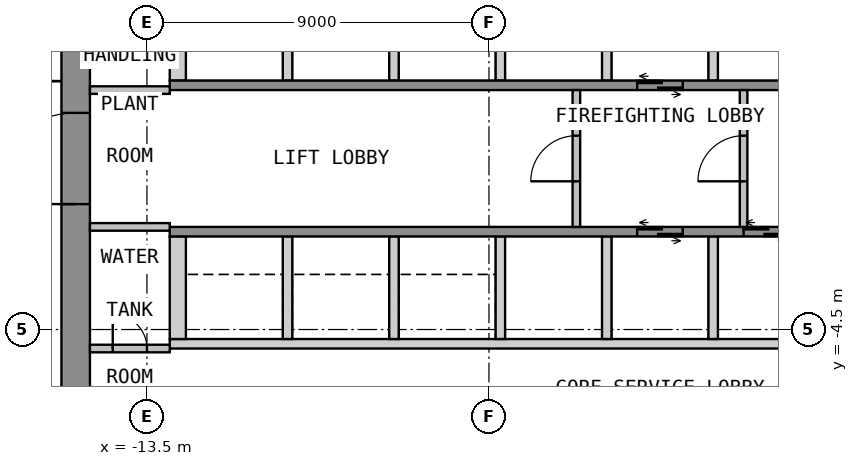
"""IFC4 building model, lengths in metres.
Left out: names, types, materials, properties, quantities, classifications, styles, units other than length and angle.
Written with IfcOpenShell. Run it as: python <this file> out.ifc"""

import sys

from ifc_helpers import new_model, si_unit, direction, frame, frame_2d, origin, place, context, subcontext, project, spatial, polyline, rectangle, outline, extrude, element, fill, save


model = new_model("IFC4")
c1 = context("Model", 3, precision=1e-05, world=origin(), true_north=direction((0.0, 1.0)))
c2 = subcontext(c1, "Body", "Model", "MODEL_VIEW")
j1 = project(units=[si_unit("LENGTHUNIT", "METRE"), si_unit("PLANEANGLEUNIT", "RADIAN")], contexts=[c1])
p1 = place(None, origin())
s1 = spatial("IfcSite", under=j1, at=p1, CompositionType="ELEMENT")
p2 = place(p1, origin())
s2 = spatial("IfcBuilding", under=s1, at=p2, CompositionType="ELEMENT")
p3 = place(p2, frame((0.0, 0.0, 128.1)))
s3 = spatial("IfcBuildingStorey", under=s2, at=p3, CompositionType="ELEMENT", Elevation=128.1)
p4 = place(p3, frame((-15.375, -12.75, 0.0), z_axis=(0.0, 0.0, 1.0), x_axis=(0.0, 1.0, 0.0)))
e1 = element("IfcWall", 1, at=p4, inside=s3, PredefinedType="SHEAR", context=c2, shape_type="SweptSolid", body=[
    extrude(rectangle(XDim=25.5, YDim=0.75, at=frame_2d((12.75, 0.0))), origin(), (0.0, 0.0, 1.0), 4.175),
])
p5 = place(p4, frame((11.55, 0.0, 0.0)))
e2 = element("IfcOpeningElement", 2, at=p5, cuts=e1, PredefinedType="OPENING", context=c2, shape_type="SweptSolid", body=[
    extrude(rectangle(XDim=2.4, YDim=2.1, at=frame_2d((1.2, 1.05))), frame((0.0, 0.385, 0.0), z_axis=(0.0, -1.0, 0.0), x_axis=(1.0, 0.0, 0.0)), (0.0, 0.0, 1.0), 0.77),
])
p6 = place(p3, origin())
e3 = element("IfcWall", 3, at=p6, inside=s3, PredefinedType="SHEAR", context=c2, shape_type="SweptSolid", body=[
    extrude(outline(polyline([(-12.9, 2.05), (-12.475, 2.05), (-12.475, 4.75), (-12.9, 4.75), (-12.9, 2.05)])), origin(), (0.0, 0.0, 1.0), 4.175),
])
p7 = place(p3, origin())
e4 = element("IfcWall", 4, at=p7, inside=s3, PredefinedType="SHEAR", context=c2, shape_type="SweptSolid", body=[
    extrude(outline(polyline([(-9.925, 2.05), (-9.675, 2.05), (-9.675, 4.75), (-9.925, 4.75), (-9.925, 2.05)])), origin(), (0.0, 0.0, 1.0), 4.175),
])
p8 = place(p3, origin())
e5 = element("IfcWall", 5, at=p8, inside=s3, PredefinedType="SHEAR", context=c2, shape_type="SweptSolid", body=[
    extrude(outline(polyline([(-7.125, 2.05), (-6.875, 2.05), (-6.875, 4.75), (-7.125, 4.75), (-7.125, 2.05)])), origin(), (0.0, 0.0, 1.0), 4.175),
])
p9 = place(p3, origin())
e6 = element("IfcWall", 6, at=p9, inside=s3, PredefinedType="SHEAR", context=c2, shape_type="SweptSolid", body=[
    extrude(outline(polyline([(-4.325, 2.05), (-4.075, 2.05), (-4.075, 4.75), (-4.325, 4.75), (-4.325, 2.05)])), origin(), (0.0, 0.0, 1.0), 4.175),
])
p10 = place(p3, origin())
e7 = element("IfcWall", 7, at=p10, inside=s3, PredefinedType="SHEAR", context=c2, shape_type="SweptSolid", body=[
    extrude(outline(polyline([(-1.525, 2.05), (-1.275, 2.05), (-1.275, 4.75), (-1.525, 4.75), (-1.525, 2.05)])), origin(), (0.0, 0.0, 1.0), 4.175),
])
p11 = place(p3, origin())
e8 = element("IfcWall", 8, at=p11, inside=s3, PredefinedType="SHEAR", context=c2, shape_type="SweptSolid", body=[
    extrude(outline(polyline([(1.275, 2.05), (1.525, 2.05), (1.525, 4.75), (1.275, 4.75), (1.275, 2.05)])), origin(), (0.0, 0.0, 1.0), 4.175),
])
p12 = place(p3, frame((-12.9, 1.925, 0.0), z_axis=(0.0, 0.0, 1.0), x_axis=(1.0, 0.0, 0.0)))
e9 = element("IfcWall", 9, at=p12, inside=s3, PredefinedType="SHEAR", context=c2, shape_type="SweptSolid", body=[
    extrude(rectangle(XDim=25.8, YDim=0.25, at=frame_2d((12.9, 0.0))), origin(), (0.0, 0.0, 1.0), 4.175),
])
p13 = place(p12, frame((12.3, 0.0, 0.0)))
e10 = element("IfcOpeningElement", 10, at=p13, cuts=e9, PredefinedType="OPENING", context=c2, shape_type="SweptSolid", body=[
    extrude(rectangle(XDim=1.2, YDim=2.1, at=frame_2d((0.6, 1.05))), frame((0.0, 0.135, 0.0), z_axis=(0.0, -1.0, 0.0), x_axis=(1.0, 0.0, 0.0)), (0.0, 0.0, 1.0), 0.27),
])
p14 = place(p12, frame((23.5, 0.0, 0.0)))
e11 = element("IfcOpeningElement", 11, at=p14, cuts=e9, PredefinedType="OPENING", context=c2, shape_type="SweptSolid", body=[
    extrude(rectangle(XDim=1.2, YDim=2.1, at=frame_2d((0.6, 1.05))), frame((0.0, 0.135, 0.0), z_axis=(0.0, -1.0, 0.0), x_axis=(1.0, 0.0, 0.0)), (0.0, 0.0, 1.0), 0.27),
])
p15 = place(p3, origin())
e12 = element("IfcWall", 12, at=p15, inside=s3, PredefinedType="SHEAR", context=c2, shape_type="SweptSolid", body=[
    extrude(outline(polyline([(-12.9, -5.0), (12.9, -5.0), (12.9, -4.75), (-12.9, -4.75), (-12.9, -5.0)])), origin(), (0.0, 0.0, 1.0), 4.175),
])
p16 = place(p3, origin())
e13 = element("IfcWall", 13, at=p16, inside=s3, PredefinedType="SHEAR", context=c2, shape_type="SweptSolid", body=[
    extrude(outline(polyline([(-12.9, -4.75), (-12.475, -4.75), (-12.475, -2.05), (-12.9, -2.05), (-12.9, -4.75)])), origin(), (0.0, 0.0, 1.0), 4.175),
])
p17 = place(p3, origin())
e14 = element("IfcWall", 14, at=p17, inside=s3, PredefinedType="SHEAR", context=c2, shape_type="SweptSolid", body=[
    extrude(outline(polyline([(-9.925, -4.75), (-9.675, -4.75), (-9.675, -2.05), (-9.925, -2.05), (-9.925, -4.75)])), origin(), (0.0, 0.0, 1.0), 4.175),
])
p18 = place(p3, origin())
e15 = element("IfcWall", 15, at=p18, inside=s3, PredefinedType="SHEAR", context=c2, shape_type="SweptSolid", body=[
    extrude(outline(polyline([(-7.125, -4.75), (-6.875, -4.75), (-6.875, -2.05), (-7.125, -2.05), (-7.125, -4.75)])), origin(), (0.0, 0.0, 1.0), 4.175),
])
p19 = place(p3, origin())
e16 = element("IfcWall", 16, at=p19, inside=s3, PredefinedType="SHEAR", context=c2, shape_type="SweptSolid", body=[
    extrude(outline(polyline([(-4.325, -4.75), (-4.075, -4.75), (-4.075, -2.05), (-4.325, -2.05), (-4.325, -4.75)])), origin(), (0.0, 0.0, 1.0), 4.175),
])
p20 = place(p3, origin())
e17 = element("IfcWall", 17, at=p20, inside=s3, PredefinedType="SHEAR", context=c2, shape_type="SweptSolid", body=[
    extrude(outline(polyline([(-1.525, -4.75), (-1.275, -4.75), (-1.275, -2.05), (-1.525, -2.05), (-1.525, -4.75)])), origin(), (0.0, 0.0, 1.0), 4.175),
])
p21 = place(p3, origin())
e18 = element("IfcWall", 18, at=p21, inside=s3, PredefinedType="SHEAR", context=c2, shape_type="SweptSolid", body=[
    extrude(outline(polyline([(1.275, -4.75), (1.525, -4.75), (1.525, -2.05), (1.275, -2.05), (1.275, -4.75)])), origin(), (0.0, 0.0, 1.0), 4.175),
])
p22 = place(p3, frame((-12.9, -1.925, 0.0), z_axis=(0.0, 0.0, 1.0), x_axis=(1.0, 0.0, 0.0)))
e19 = element("IfcWall", 19, at=p22, inside=s3, PredefinedType="SHEAR", context=c2, shape_type="SweptSolid", body=[
    extrude(rectangle(XDim=25.8, YDim=0.25, at=frame_2d((12.9, 0.0))), origin(), (0.0, 0.0, 1.0), 4.175),
])
p23 = place(p22, frame((12.3, 0.0, 0.0)))
e20 = element("IfcOpeningElement", 20, at=p23, cuts=e19, PredefinedType="OPENING", context=c2, shape_type="SweptSolid", body=[
    extrude(rectangle(XDim=1.2, YDim=2.1, at=frame_2d((0.6, 1.05))), frame((0.0, 0.135, 0.0), z_axis=(0.0, -1.0, 0.0), x_axis=(1.0, 0.0, 0.0)), (0.0, 0.0, 1.0), 0.27),
])
p24 = place(p22, frame((15.1, 0.0, 0.0)))
e21 = element("IfcOpeningElement", 21, at=p24, cuts=e19, PredefinedType="OPENING", context=c2, shape_type="SweptSolid", body=[
    extrude(rectangle(XDim=1.2, YDim=2.1, at=frame_2d((0.6, 1.05))), frame((0.0, 0.135, 0.0), z_axis=(0.0, -1.0, 0.0), x_axis=(1.0, 0.0, 0.0)), (0.0, 0.0, 1.0), 0.27),
])
p25 = place(p3, frame((-2.2, -1.8, 0.0), z_axis=(0.0, 0.0, 1.0), x_axis=(0.0, 1.0, 0.0)))
e22 = element("IfcWall", 22, at=p25, inside=s3, PredefinedType="PARTITIONING", context=c2, shape_type="SweptSolid", body=[
    extrude(rectangle(XDim=3.6, YDim=0.2, at=frame_2d((1.8, 0.0))), origin(), (0.0, 0.0, 1.0), 4.175),
])
p26 = place(p25, frame((1.2, 0.0, 0.0)))
e23 = element("IfcOpeningElement", 23, at=p26, cuts=e22, PredefinedType="OPENING", context=c2, shape_type="SweptSolid", body=[
    extrude(rectangle(XDim=1.2, YDim=2.1, at=frame_2d((0.6, 1.05))), frame((0.0, 0.11, 0.0), z_axis=(0.0, -1.0, 0.0), x_axis=(1.0, 0.0, 0.0)), (0.0, 0.0, 1.0), 0.22),
])
p27 = place(p3, frame((2.2, -1.8, 0.0), z_axis=(0.0, 0.0, 1.0), x_axis=(0.0, 1.0, 0.0)))
e24 = element("IfcWall", 24, at=p27, inside=s3, PredefinedType="PARTITIONING", context=c2, shape_type="SweptSolid", body=[
    extrude(rectangle(XDim=3.6, YDim=0.2, at=frame_2d((1.8, 0.0))), origin(), (0.0, 0.0, 1.0), 4.175),
])
p28 = place(p27, frame((1.2, 0.0, 0.0)))
e25 = element("IfcOpeningElement", 25, at=p28, cuts=e24, PredefinedType="OPENING", context=c2, shape_type="SweptSolid", body=[
    extrude(rectangle(XDim=1.2, YDim=2.1, at=frame_2d((0.6, 1.05))), frame((0.0, 0.11, 0.0), z_axis=(0.0, -1.0, 0.0), x_axis=(1.0, 0.0, 0.0)), (0.0, 0.0, 1.0), 0.22),
])
p29 = place(p3, frame((-15.0, 1.8, 0.0), z_axis=(0.0, 0.0, 1.0), x_axis=(1.0, 0.0, 0.0)))
e26 = element("IfcWall", 26, at=p29, inside=s3, PredefinedType="PARTITIONING", context=c2, shape_type="SweptSolid", body=[
    extrude(rectangle(XDim=2.1, YDim=0.2, at=frame_2d((1.05, 0.0))), origin(), (0.0, 0.0, 1.0), 4.175),
])
p30 = place(p3, frame((-15.0, -5.0, 0.0), z_axis=(0.0, 0.0, 1.0), x_axis=(1.0, 0.0, 0.0)))
e27 = element("IfcWall", 27, at=p30, inside=s3, PredefinedType="PARTITIONING", context=c2, shape_type="SweptSolid", body=[
    extrude(rectangle(XDim=2.1, YDim=0.2, at=frame_2d((1.05, 0.0))), origin(), (0.0, 0.0, 1.0), 4.175),
])
p31 = place(p30, frame((0.6, 0.0, 0.0)))
e28 = element("IfcOpeningElement", 28, at=p31, cuts=e27, PredefinedType="OPENING", context=c2, shape_type="SweptSolid", body=[
    extrude(rectangle(XDim=0.9, YDim=2.1, at=frame_2d((0.45, 1.05))), frame((0.0, 0.11, 0.0), z_axis=(0.0, -1.0, 0.0), x_axis=(1.0, 0.0, 0.0)), (0.0, 0.0, 1.0), 0.22),
])
p32 = place(p3, frame((-15.0, -1.8, 0.0), z_axis=(0.0, 0.0, 1.0), x_axis=(1.0, 0.0, 0.0)))
e29 = element("IfcWall", 29, at=p32, inside=s3, PredefinedType="PARTITIONING", context=c2, shape_type="SweptSolid", body=[
    extrude(rectangle(XDim=2.1, YDim=0.2, at=frame_2d((1.05, 0.0))), origin(), (0.0, 0.0, 1.0), 4.175),
])
p33 = place(p5, origin())
e30 = element("IfcDoor", 30, at=p33, inside=s3, OperationType="DOUBLE_DOOR_DOUBLE_SWING", PredefinedType="DOOR", context=c2, shape_type="SweptSolid", body=[
    extrude(rectangle(XDim=2.4, YDim=2.1, at=frame_2d((1.2, 1.05))), frame((0.0, 0.025, 0.0), z_axis=(0.0, -1.0, 0.0), x_axis=(1.0, 0.0, 0.0)), (0.0, 0.0, 1.0), 0.05),
])
fill(e2, e30)
p34 = place(p13, origin())
e31 = element("IfcDoor", 31, at=p34, inside=s3, OperationType="DOUBLE_DOOR_SLIDING", PredefinedType="DOOR", context=c2, shape_type="SweptSolid", body=[
    extrude(rectangle(XDim=1.2, YDim=2.1, at=frame_2d((0.6, 1.05))), frame((0.0, 0.025, 0.0), z_axis=(0.0, -1.0, 0.0), x_axis=(1.0, 0.0, 0.0)), (0.0, 0.0, 1.0), 0.05),
])
fill(e10, e31)
p35 = place(p23, origin())
e32 = element("IfcDoor", 32, at=p35, inside=s3, OperationType="DOUBLE_DOOR_SLIDING", PredefinedType="DOOR", context=c2, shape_type="SweptSolid", body=[
    extrude(rectangle(XDim=1.2, YDim=2.1, at=frame_2d((0.6, 1.05))), frame((0.0, 0.025, 0.0), z_axis=(0.0, -1.0, 0.0), x_axis=(1.0, 0.0, 0.0)), (0.0, 0.0, 1.0), 0.05),
])
fill(e20, e32)
p36 = place(p24, origin())
e33 = element("IfcDoor", 33, at=p36, inside=s3, OperationType="DOUBLE_DOOR_SLIDING", PredefinedType="DOOR", context=c2, shape_type="SweptSolid", body=[
    extrude(rectangle(XDim=1.2, YDim=2.1, at=frame_2d((0.6, 1.05))), frame((0.0, 0.025, 0.0), z_axis=(0.0, -1.0, 0.0), x_axis=(1.0, 0.0, 0.0)), (0.0, 0.0, 1.0), 0.05),
])
fill(e21, e33)
p37 = place(p26, origin())
e34 = element("IfcDoor", 34, at=p37, inside=s3, OperationType="SINGLE_SWING_LEFT", PredefinedType="DOOR", context=c2, shape_type="SweptSolid", body=[
    extrude(rectangle(XDim=1.2, YDim=2.1, at=frame_2d((0.6, 1.05))), frame((0.0, 0.025, 0.0), z_axis=(0.0, -1.0, 0.0), x_axis=(1.0, 0.0, 0.0)), (0.0, 0.0, 1.0), 0.05),
])
fill(e23, e34)
p38 = place(p28, origin())
e35 = element("IfcDoor", 35, at=p38, inside=s3, OperationType="SINGLE_SWING_LEFT", PredefinedType="DOOR", context=c2, shape_type="SweptSolid", body=[
    extrude(rectangle(XDim=1.2, YDim=2.1, at=frame_2d((0.6, 1.05))), frame((0.0, 0.025, 0.0), z_axis=(0.0, -1.0, 0.0), x_axis=(1.0, 0.0, 0.0)), (0.0, 0.0, 1.0), 0.05),
])
fill(e25, e35)
p39 = place(p31, origin())
e36 = element("IfcDoor", 36, at=p39, inside=s3, OperationType="SINGLE_SWING_LEFT", PredefinedType="DOOR", context=c2, shape_type="SweptSolid", body=[
    extrude(rectangle(XDim=0.9, YDim=2.1, at=frame_2d((0.45, 1.05))), frame((0.0, 0.025, 0.0), z_axis=(0.0, -1.0, 0.0), x_axis=(1.0, 0.0, 0.0)), (0.0, 0.0, 1.0), 0.05),
])
fill(e28, e36)
save(model, sys.argv[1])
